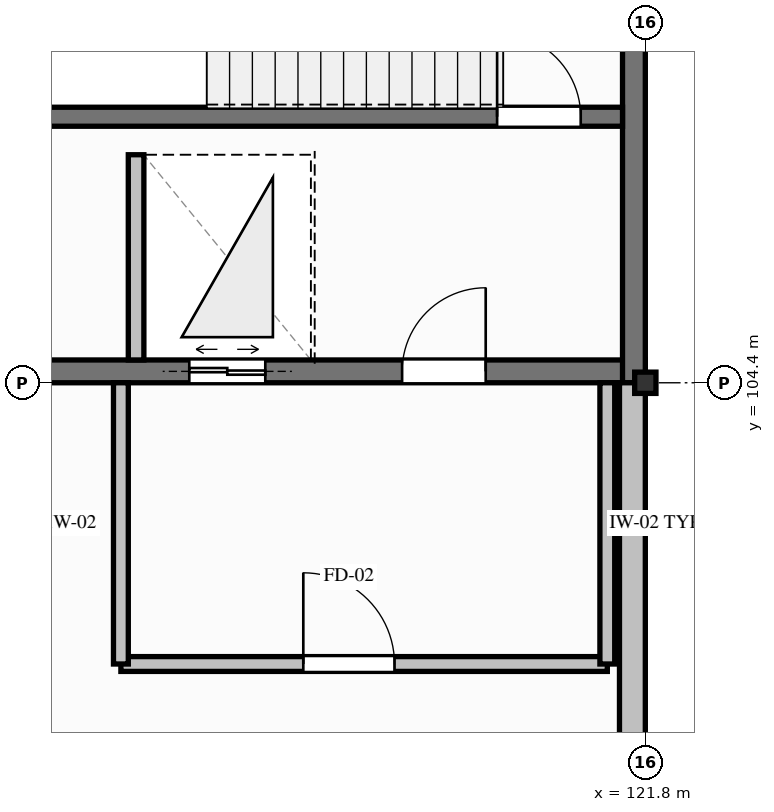
"""IFC4 building model, lengths in metres.
Left out: names, types, materials, properties, quantities, classifications, styles, units other than length and angle.
Written with IfcOpenShell. Run it as: python <this file> out.ifc"""

import sys

from ifc_helpers import new_model, si_unit, direction, frame, frame_2d, origin, origin_2d, place, context, subcontext, project, spatial, rectangle, i_section, extrude, element, fill, save


model = new_model("IFC4")
c1 = context("Model", 3, precision=1e-05, world=origin(), true_north=direction((0.0, 1.0)))
c2 = subcontext(c1, "Body", "Model", "MODEL_VIEW")
j1 = project(units=[si_unit("LENGTHUNIT", "METRE"), si_unit("PLANEANGLEUNIT", "RADIAN")], contexts=[c1])
p1 = place(None, origin())
s1 = spatial("IfcSite", under=j1, at=p1, CompositionType="ELEMENT")
p2 = place(p1, origin())
s2 = spatial("IfcBuilding", under=s1, at=p2, CompositionType="ELEMENT")
p3 = place(p2, frame((0.0, 0.0, 13.2)))
s3 = spatial("IfcBuildingStorey", under=s2, at=p3, CompositionType="ELEMENT", Elevation=13.2)
p4 = place(p3, frame((113.4, 104.55, 0.0), z_axis=(0.0, 0.0, 1.0), x_axis=(1.0, 0.0, 0.0)))
e1 = element("IfcWall", 1, at=p4, inside=s3, PredefinedType="SHEAR", context=c2, shape_type="SweptSolid", body=[
    extrude(rectangle(XDim=8.4, YDim=0.3, at=frame_2d((4.2, 0.0))), origin(), (0.0, 0.0, 1.0), 4.05),
])
p5 = place(p4, frame((5.2, 0.0, 0.0)))
e2 = element("IfcOpeningElement", 2, at=p5, cuts=e1, PredefinedType="OPENING", context=c2, shape_type="SweptSolid", body=[
    extrude(rectangle(XDim=1.1, YDim=2.15, at=frame_2d((0.55, 1.075))), frame((0.0, 0.16, 0.0), z_axis=(0.0, -1.0, 0.0), x_axis=(1.0, 0.0, 0.0)), (0.0, 0.0, 1.0), 0.32),
])
p6 = place(p4, frame((2.4, 0.0, 0.0)))
e3 = element("IfcOpeningElement", 3, at=p6, cuts=e1, PredefinedType="OPENING", context=c2, shape_type="SweptSolid", body=[
    extrude(rectangle(XDim=1.0, YDim=2.1, at=frame_2d((0.5, 1.05))), frame((0.0, 0.16, 0.0), z_axis=(0.0, -1.0, 0.0), x_axis=(1.0, 0.0, 0.0)), (0.0, 0.0, 1.0), 0.32),
])
p7 = place(p3, frame((121.65, 111.6, 0.0), z_axis=(0.0, 0.0, 1.0), x_axis=(0.0, -1.0, 0.0)))
e4 = element("IfcWall", 4, at=p7, inside=s3, PredefinedType="SHEAR", context=c2, shape_type="SweptSolid", body=[
    extrude(rectangle(XDim=7.2, YDim=0.3, at=frame_2d((3.6, 0.0))), origin(), (0.0, 0.0, 1.0), 4.05),
])
p8 = place(p3, frame((113.7, 107.9, 0.0), z_axis=(0.0, 0.0, 1.0), x_axis=(1.0, 0.0, 0.0)))
e5 = element("IfcWall", 5, at=p8, inside=s3, PredefinedType="SHEAR", context=c2, shape_type="SweptSolid", body=[
    extrude(rectangle(XDim=7.8, YDim=0.25, at=frame_2d((3.9, 0.0))), origin(), (0.0, 0.0, 1.0), 4.05),
])
p9 = place(p8, frame((6.15, 0.0, 0.0)))
e6 = element("IfcOpeningElement", 6, at=p9, cuts=e5, PredefinedType="OPENING", context=c2, shape_type="SweptSolid", body=[
    extrude(rectangle(XDim=1.1, YDim=2.15, at=frame_2d((0.55, 1.075))), frame((0.0, 0.135, 0.0), z_axis=(0.0, -1.0, 0.0), x_axis=(1.0, 0.0, 0.0)), (0.0, 0.0, 1.0), 0.27),
])
p10 = place(p3, frame((121.8, 104.4, 0.0), z_axis=(0.0, 0.0, 1.0), x_axis=(1.0, 0.0, 0.0)))
e7 = element("IfcColumn", 7, at=p10, inside=s3, PredefinedType="COLUMN", context=c2, shape_type="SweptSolid", body=[
    extrude(i_section(OverallWidth=0.28, OverallDepth=0.28, WebThickness=0.01, FlangeThickness=0.018, FilletRadius=0.024, at=origin_2d()), origin(), (0.0, 0.0, 1.0), 4.05),
])
p11 = place(p3, frame((121.63, 104.4, 0.0), z_axis=(0.0, 0.0, 1.0), x_axis=(0.0, -1.0, 0.0)))
e8 = element("IfcWall", 8, at=p11, inside=s3, PredefinedType="SOLIDWALL", context=c2, shape_type="SweptSolid", body=[
    extrude(rectangle(XDim=21.6, YDim=0.34, at=frame_2d((10.8, 0.0))), origin(), (0.0, 0.0, 1.0), 3.168),
])
p12 = place(p3, frame((115.1, 104.7, 0.0), z_axis=(0.0, 0.0, 1.0), x_axis=(0.0, 1.0, 0.0)))
e9 = element("IfcWall", 9, at=p12, inside=s3, PredefinedType="PARTITIONING", context=c2, shape_type="SweptSolid", body=[
    extrude(rectangle(XDim=2.7, YDim=0.205, at=frame_2d((1.35, 0.0))), origin(), (0.0, 0.0, 1.0), 3.338),
])
p13 = place(p3, frame((114.9, 100.7, 0.0), z_axis=(0.0, 0.0, 1.0), x_axis=(1.0, 0.0, 0.0)))
e10 = element("IfcWall", 10, at=p13, inside=s3, PredefinedType="PARTITIONING", context=c2, shape_type="SweptSolid", body=[
    extrude(rectangle(XDim=6.4, YDim=0.195, at=frame_2d((3.2, 0.0))), origin(), (0.0, 0.0, 1.0), 3.78),
])
p14 = place(p13, frame((2.4, 0.0, 0.0)))
e11 = element("IfcOpeningElement", 11, at=p14, cuts=e10, PredefinedType="OPENING", context=c2, shape_type="SweptSolid", body=[
    extrude(rectangle(XDim=1.2, YDim=2.15, at=frame_2d((0.6, 1.075))), frame((0.0, 0.107, 0.0), z_axis=(0.0, -1.0, 0.0), x_axis=(1.0, 0.0, 0.0)), (0.0, 0.0, 1.0), 0.215),
])
for number, where, z_axis, x_axis in (
    (12, (121.3, 100.7, 0.0), (0.0, 0.0, 1.0), (0.0, 1.0, 0.0)),
    (13, (114.9, 100.7, 0.0), (0.0, 0.0, 1.0), (0.0, 1.0, 0.0)),
):
    element("IfcWall", number, at=place(p3, frame(where, z_axis=z_axis, x_axis=x_axis)), inside=s3, PredefinedType="PARTITIONING", context=c2, shape_type="SweptSolid", body=[
        extrude(rectangle(XDim=3.7, YDim=0.195, at=frame_2d((1.85, 0.0))), origin(), (0.0, 0.0, 1.0), 3.338),
    ])
p15 = place(p9, origin())
e14 = element("IfcDoor", 14, at=p15, inside=s3, OperationType="SINGLE_SWING_LEFT", PredefinedType="DOOR", context=c2, shape_type="SweptSolid", body=[
    extrude(rectangle(XDim=1.1, YDim=2.15, at=frame_2d((0.55, 1.075))), frame((0.0, 0.025, 0.0), z_axis=(0.0, -1.0, 0.0), x_axis=(1.0, 0.0, 0.0)), (0.0, 0.0, 1.0), 0.05),
])
fill(e6, e14)
p16 = place(p5, origin())
e15 = element("IfcDoor", 15, at=p16, inside=s3, OperationType="SINGLE_SWING_RIGHT", PredefinedType="DOOR", context=c2, shape_type="SweptSolid", body=[
    extrude(rectangle(XDim=1.1, YDim=2.15, at=frame_2d((0.55, 1.075))), frame((0.0, 0.025, 0.0), z_axis=(0.0, -1.0, 0.0), x_axis=(1.0, 0.0, 0.0)), (0.0, 0.0, 1.0), 0.05),
])
fill(e2, e15)
p17 = place(p6, origin())
e16 = element("IfcDoor", 16, at=p17, inside=s3, OperationType="DOUBLE_DOOR_SLIDING", PredefinedType="DOOR", context=c2, shape_type="SweptSolid", body=[
    extrude(rectangle(XDim=1.0, YDim=2.1, at=frame_2d((0.5, 1.05))), frame((0.0, 0.025, 0.0), z_axis=(0.0, -1.0, 0.0), x_axis=(1.0, 0.0, 0.0)), (0.0, 0.0, 1.0), 0.05),
])
fill(e3, e16)
p18 = place(p14, origin())
e17 = element("IfcDoor", 17, at=p18, inside=s3, OperationType="SINGLE_SWING_LEFT", PredefinedType="DOOR", context=c2, shape_type="SweptSolid", body=[
    extrude(rectangle(XDim=1.2, YDim=2.15, at=frame_2d((0.6, 1.075))), frame((0.0, 0.025, 0.0), z_axis=(0.0, -1.0, 0.0), x_axis=(1.0, 0.0, 0.0)), (0.0, 0.0, 1.0), 0.05),
])
fill(e11, e17)
save(model, sys.argv[1])
